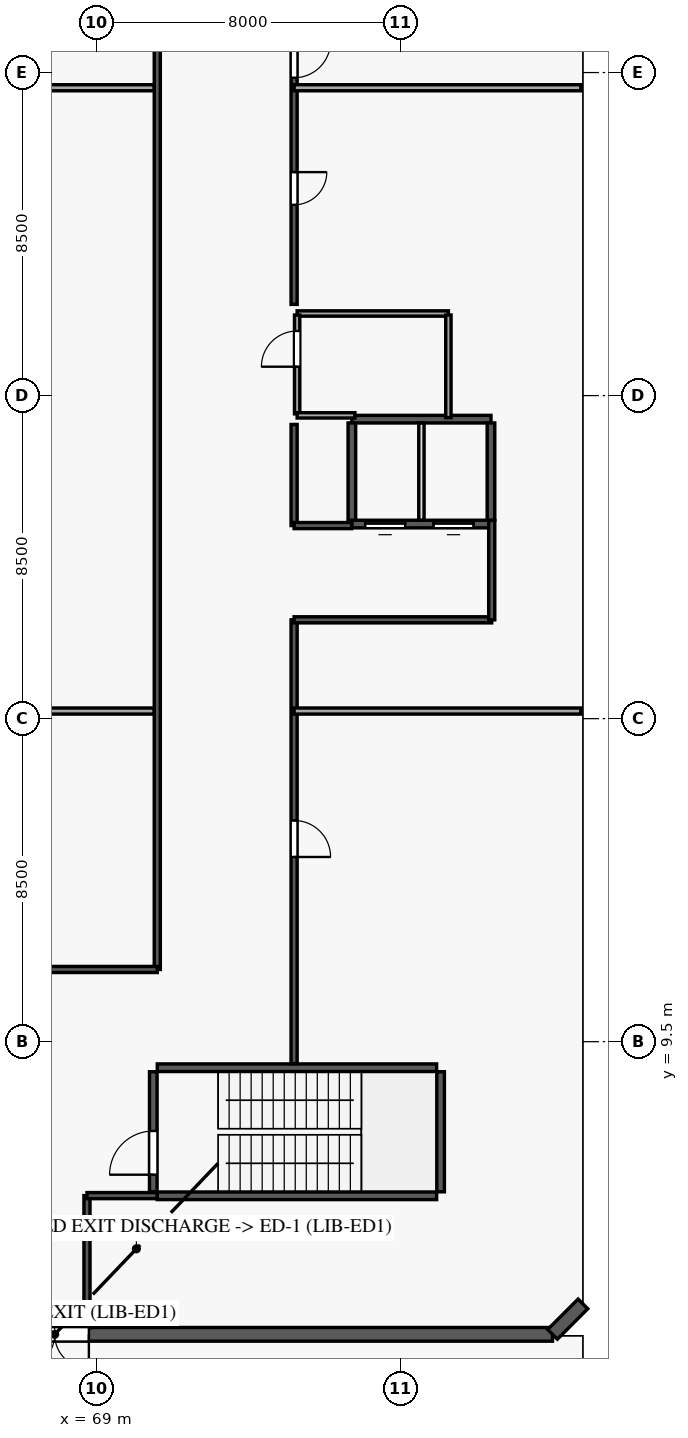
"""IFC4 building model, lengths in metres.
Left out: names, types, materials, properties, quantities, classifications, styles, units other than length and angle.
Written with IfcOpenShell. Run it as: python <this file> out.ifc"""

import sys

from ifc_helpers import new_model, si_unit, direction, frame, frame_2d, origin, origin_with_axes, origin_2d, place, context, subcontext, project, spatial, rectangle, circle, extrude, source, transform, mapped, element, fill, save


model = new_model("IFC4")
c1 = context("Model", 3, precision=1e-05, world=origin(), true_north=direction((0.0, 1.0)))
c2 = subcontext(c1, "Body", "Model", "MODEL_VIEW")
j1 = project(units=[si_unit("LENGTHUNIT", "METRE"), si_unit("PLANEANGLEUNIT", "RADIAN")], contexts=[c1])
p1 = place(None, origin())
s1 = spatial("IfcSite", under=j1, at=p1, CompositionType="ELEMENT")
p2 = place(p1, origin())
s2 = spatial("IfcBuilding", under=s1, at=p2, CompositionType="ELEMENT")
p3 = place(p2, origin())
s3 = spatial("IfcBuildingStorey", under=s2, at=p3, CompositionType="ELEMENT", Elevation=0.0)
m1 = source(origin_with_axes(), c2, "Body", "SweptSolid", [
    extrude(circle(Radius=0.375, at=origin_2d()), origin(), (0.0, 0.0, 1.0), 4.5),
])
for number, where, z_axis, x_axis in (
    (1, (69.6, 3.05, 0.0), (0.0, 0.0, 1.0), (1.0, 0.0, 0.0)),
    (2, (75.4, 3.05, 0.0), (0.0, 0.0, 1.0), (1.0, 0.0, 0.0)),
    (3, (81.2, 3.05, 0.0), (0.0, 0.0, 1.0), (1.0, 0.0, 0.0)),
    (4, (69.6, 4.8, 0.0), (0.0, 0.0, 1.0), (1.0, 0.0, 0.0)),
    (5, (69.6, 12.0, 0.0), (0.0, 0.0, 1.0), (1.0, 0.0, 0.0)),
    (6, (69.6, 19.2, 0.0), (0.0, 0.0, 1.0), (1.0, 0.0, 0.0)),
    (7, (69.6, 26.5, 0.0), (0.0, 0.0, 1.0), (1.0, 0.0, 0.0)),
    (8, (69.6, 33.8, 0.0), (0.0, 0.0, 1.0), (1.0, 0.0, 0.0)),
):
    element("IfcColumn", number, at=place(p3, frame(where, z_axis=z_axis, x_axis=x_axis)), inside=s3, PredefinedType="COLUMN", context=c2, shape_type="MappedRepresentation", body=[
        mapped(m1, transform((0.0, 0.0, 0.0), scale=1.0)),
    ])
m2 = source(origin_with_axes(), c2, "Body", "SweptSolid", [
    extrude(circle(Radius=0.425, at=origin_2d()), origin(), (0.0, 0.0, 1.0), 4.5),
])
for number, where, z_axis, x_axis in (
    (9, (75.4, 4.8, 0.0), (0.0, 0.0, 1.0), (1.0, 0.0, 0.0)),
    (10, (75.4, 12.0, 0.0), (0.0, 0.0, 1.0), (1.0, 0.0, 0.0)),
    (11, (75.4, 19.2, 0.0), (0.0, 0.0, 1.0), (1.0, 0.0, 0.0)),
    (12, (75.4, 26.5, 0.0), (0.0, 0.0, 1.0), (1.0, 0.0, 0.0)),
    (13, (75.4, 33.8, 0.0), (0.0, 0.0, 1.0), (1.0, 0.0, 0.0)),
):
    element("IfcColumn", number, at=place(p3, frame(where, z_axis=z_axis, x_axis=x_axis)), inside=s3, PredefinedType="COLUMN", context=c2, shape_type="MappedRepresentation", body=[
        mapped(m2, transform((0.0, 0.0, 0.0), scale=1.0)),
    ])
for number, where, z_axis, x_axis in (
    (14, (81.2, 4.8, 0.0), (0.0, 0.0, 1.0), (1.0, 0.0, 0.0)),
    (15, (81.2, 12.0, 0.0), (0.0, 0.0, 1.0), (1.0, 0.0, 0.0)),
    (16, (81.2, 19.2, 0.0), (0.0, 0.0, 1.0), (1.0, 0.0, 0.0)),
    (17, (81.2, 26.5, 0.0), (0.0, 0.0, 1.0), (1.0, 0.0, 0.0)),
    (18, (81.2, 33.8, 0.0), (0.0, 0.0, 1.0), (1.0, 0.0, 0.0)),
):
    element("IfcColumn", number, at=place(p3, frame(where, z_axis=z_axis, x_axis=x_axis)), inside=s3, PredefinedType="COLUMN", context=c2, shape_type="MappedRepresentation", body=[
        mapped(m1, transform((0.0, 0.0, 0.0), scale=1.0)),
    ])
m3 = source(origin_with_axes(), c2, "Body", "SweptSolid", [
    extrude(rectangle(XDim=0.5, YDim=0.75, at=origin_2d()), origin(), (0.0, 0.0, 1.0), 4.5),
])
p4 = place(p3, frame((72.5, 12.0, 0.0), z_axis=(0.0, 0.0, 1.0), x_axis=(1.0, 0.0, 0.0)))
e19 = element("IfcColumn", 19, at=p4, inside=s3, PredefinedType="PILASTER", context=c2, shape_type="MappedRepresentation", body=[
    mapped(m3, transform((0.0, 0.0, 0.0), scale=1.0)),
])
p5 = place(p3, frame((81.0, 1.8, 0.0), z_axis=(0.0, 0.0, 1.0), x_axis=(-1.0, 0.0, 0.0)))
e20 = element("IfcWall", 20, at=p5, inside=s3, PredefinedType="SOLIDWALL", context=c2, shape_type="SweptSolid", body=[
    extrude(rectangle(XDim=14.8, YDim=0.36, at=frame_2d((7.4, 0.0))), origin(), (0.0, 0.0, 1.0), 4.2),
])
p6 = place(p5, frame((8.285, 0.0, 0.85)))
e21 = element("IfcOpeningElement", 21, at=p6, cuts=e20, PredefinedType="OPENING", context=c2, shape_type="SweptSolid", body=[
    extrude(rectangle(XDim=1.6, YDim=2.2, at=frame_2d((0.8, 1.1))), frame((0.0, 0.19, 0.0), z_axis=(0.0, -1.0, 0.0), x_axis=(1.0, 0.0, 0.0)), (0.0, 0.0, 1.0), 0.38),
])
p7 = place(p5, frame((2.595, 0.0, 0.85)))
e22 = element("IfcOpeningElement", 22, at=p7, cuts=e20, PredefinedType="OPENING", context=c2, shape_type="SweptSolid", body=[
    extrude(rectangle(XDim=1.6, YDim=2.2, at=frame_2d((0.8, 1.1))), frame((0.0, 0.19, 0.0), z_axis=(0.0, -1.0, 0.0), x_axis=(1.0, 0.0, 0.0)), (0.0, 0.0, 1.0), 0.38),
])
p8 = place(p5, frame((12.2, 0.0, 0.0)))
e23 = element("IfcOpeningElement", 23, at=p8, cuts=e20, PredefinedType="OPENING", context=c2, shape_type="SweptSolid", body=[
    extrude(rectangle(XDim=1.8, YDim=2.3, at=frame_2d((0.9, 1.15))), frame((0.0, 0.19, 0.0), z_axis=(0.0, -1.0, 0.0), x_axis=(1.0, 0.0, 0.0)), (0.0, 0.0, 1.0), 0.38),
])
p9 = place(p3, frame((81.0, 1.8, 0.0), z_axis=(0.0, 0.0, 1.0), x_axis=(0.707106781187, 0.707106781187, 0.0)))
e24 = element("IfcWall", 24, at=p9, inside=s3, PredefinedType="SOLIDWALL", context=c2, shape_type="SweptSolid", body=[
    extrude(rectangle(XDim=1.131, YDim=0.36, at=frame_2d((0.566, 0.0))), origin(), (0.0, 0.0, 1.0), 4.2),
])
for number, where, z_axis, x_axis in (
    (25, (70.6, 5.445, 0.0), (0.0, 0.0, 1.0), (1.0, 0.0, 0.0)),
    (26, (70.6, 8.815, 0.0), (0.0, 0.0, 1.0), (1.0, 0.0, 0.0)),
):
    element("IfcWall", number, at=place(p3, frame(where, z_axis=z_axis, x_axis=x_axis)), inside=s3, PredefinedType="SHEAR", context=c2, shape_type="SweptSolid", body=[
        extrude(rectangle(XDim=7.35, YDim=0.2, at=frame_2d((3.675, 0.0))), origin(), (0.0, 0.0, 1.0), 4.2),
    ])
p10 = place(p3, frame((75.72, 23.12, 0.0), z_axis=(0.0, 0.0, 1.0), x_axis=(1.0, 0.0, 0.0)))
e27 = element("IfcWall", 27, at=p10, inside=s3, PredefinedType="SHEAR", context=c2, shape_type="SweptSolid", body=[
    extrude(rectangle(XDim=3.66, YDim=0.2, at=frame_2d((1.83, 0.0))), origin(), (0.0, 0.0, 1.0), 4.2),
])
p11 = place(p10, frame((0.35, 0.0, 0.0)))
e28 = element("IfcOpeningElement", 28, at=p11, cuts=e27, PredefinedType="OPENING", context=c2, shape_type="SweptSolid", body=[
    extrude(rectangle(XDim=1.05, YDim=2.15, at=frame_2d((0.525, 1.075))), frame((0.0, 0.11, 0.0), z_axis=(0.0, -1.0, 0.0), x_axis=(1.0, 0.0, 0.0)), (0.0, 0.0, 1.0), 0.22),
])
p12 = place(p10, frame((2.15, 0.0, 0.0)))
e29 = element("IfcOpeningElement", 29, at=p12, cuts=e27, PredefinedType="OPENING", context=c2, shape_type="SweptSolid", body=[
    extrude(rectangle(XDim=1.05, YDim=2.15, at=frame_2d((0.525, 1.075))), frame((0.0, 0.11, 0.0), z_axis=(0.0, -1.0, 0.0), x_axis=(1.0, 0.0, 0.0)), (0.0, 0.0, 1.0), 0.22),
])
p13 = place(p3, frame((75.72, 25.88, 0.0), z_axis=(0.0, 0.0, 1.0), x_axis=(1.0, 0.0, 0.0)))
e30 = element("IfcWall", 30, at=p13, inside=s3, PredefinedType="SHEAR", context=c2, shape_type="SweptSolid", body=[
    extrude(rectangle(XDim=3.66, YDim=0.2, at=frame_2d((1.83, 0.0))), origin(), (0.0, 0.0, 1.0), 4.2),
])
p14 = place(p3, frame((70.495, 5.55, 0.0), z_axis=(0.0, 0.0, 1.0), x_axis=(0.0, 1.0, 0.0)))
e31 = element("IfcWall", 31, at=p14, inside=s3, PredefinedType="SHEAR", context=c2, shape_type="SweptSolid", body=[
    extrude(rectangle(XDim=3.16, YDim=0.2, at=frame_2d((1.58, 0.0))), origin(), (0.0, 0.0, 1.0), 4.2),
])
p15 = place(p14, frame((0.45, 0.0, 0.0)))
e32 = element("IfcOpeningElement", 32, at=p15, cuts=e31, PredefinedType="OPENING", context=c2, shape_type="SweptSolid", body=[
    extrude(rectangle(XDim=1.15, YDim=2.15, at=frame_2d((0.575, 1.075))), frame((0.0, 0.11, 0.0), z_axis=(0.0, -1.0, 0.0), x_axis=(1.0, 0.0, 0.0)), (0.0, 0.0, 1.0), 0.22),
])
p16 = place(p3, frame((78.055, 5.55, 0.0), z_axis=(0.0, 0.0, 1.0), x_axis=(0.0, 1.0, 0.0)))
e33 = element("IfcWall", 33, at=p16, inside=s3, PredefinedType="SHEAR", context=c2, shape_type="SweptSolid", body=[
    extrude(rectangle(XDim=3.16, YDim=0.2, at=frame_2d((1.58, 0.0))), origin(), (0.0, 0.0, 1.0), 4.2),
])
for number, where, z_axis, x_axis in (
    (34, (75.72, 23.22, 0.0), (0.0, 0.0, 1.0), (0.0, 1.0, 0.0)),
    (35, (79.38, 23.22, 0.0), (0.0, 0.0, 1.0), (0.0, 1.0, 0.0)),
):
    element("IfcWall", number, at=place(p3, frame(where, z_axis=z_axis, x_axis=x_axis)), inside=s3, PredefinedType="SHEAR", context=c2, shape_type="SweptSolid", body=[
        extrude(rectangle(XDim=2.56, YDim=0.2, at=frame_2d((1.28, 0.0))), origin(), (0.0, 0.0, 1.0), 4.2),
    ])
p17 = place(p3, frame((70.6, 11.4, 0.0), z_axis=(0.0, 0.0, 1.0), x_axis=(0.0, 1.0, 0.0)))
e36 = element("IfcWall", 36, at=p17, inside=s3, PredefinedType="PARTITIONING", context=c2, shape_type="SweptSolid", body=[
    extrude(rectangle(XDim=30.2, YDim=0.16, at=frame_2d((15.1, 0.0))), origin(), (0.0, 0.0, 1.0), 4.2),
])
p18 = place(p3, frame((74.2, 44.038, 0.0), z_axis=(0.0, 0.0, 1.0), x_axis=(0.0, -1.0, 0.0)))
e37 = element("IfcWall", 37, at=p18, inside=s3, PredefinedType="PARTITIONING", context=c2, shape_type="SweptSolid", body=[
    extrude(rectangle(XDim=15.138, YDim=0.16, at=frame_2d((7.569, 0.0))), origin(), (0.0, 0.0, 1.0), 4.2),
])
p19 = place(p18, frame((8.216, 0.0, 0.0)))
e38 = element("IfcOpeningElement", 38, at=p19, cuts=e37, PredefinedType="OPENING", context=c2, shape_type="SweptSolid", body=[
    extrude(rectangle(XDim=0.96, YDim=2.15, at=frame_2d((0.48, 1.075))), frame((0.0, 0.09, 0.0), z_axis=(0.0, -1.0, 0.0), x_axis=(1.0, 0.0, 0.0)), (0.0, 0.0, 1.0), 0.18),
])
p20 = place(p18, frame((7.01, 0.0, 0.0)))
e39 = element("IfcOpeningElement", 39, at=p20, cuts=e37, PredefinedType="OPENING", context=c2, shape_type="SweptSolid", body=[
    extrude(rectangle(XDim=0.96, YDim=2.15, at=frame_2d((0.48, 1.075))), frame((0.0, 0.09, 0.0), z_axis=(0.0, -1.0, 0.0), x_axis=(1.0, 0.0, 0.0)), (0.0, 0.0, 1.0), 0.18),
])
p21 = place(p18, frame((11.658, 0.0, 0.0)))
e40 = element("IfcOpeningElement", 40, at=p21, cuts=e37, PredefinedType="OPENING", context=c2, shape_type="SweptSolid", body=[
    extrude(rectangle(XDim=0.86, YDim=2.04, at=frame_2d((0.43, 1.02))), frame((0.0, 0.09, 0.0), z_axis=(0.0, -1.0, 0.0), x_axis=(1.0, 0.0, 0.0)), (0.0, 0.0, 1.0), 0.18),
])
p22 = place(p3, frame((74.2, 20.6, 0.0), z_axis=(0.0, 0.0, 1.0), x_axis=(0.0, -1.0, 0.0)))
e41 = element("IfcWall", 41, at=p22, inside=s3, PredefinedType="PARTITIONING", context=c2, shape_type="SweptSolid", body=[
    extrude(rectangle(XDim=11.678, YDim=0.16, at=frame_2d((5.839, 0.0))), origin(), (0.0, 0.0, 1.0), 4.2),
])
p23 = place(p22, frame((5.28, 0.0, 0.0)))
e42 = element("IfcOpeningElement", 42, at=p23, cuts=e41, PredefinedType="OPENING", context=c2, shape_type="SweptSolid", body=[
    extrude(rectangle(XDim=0.96, YDim=2.15, at=frame_2d((0.48, 1.075))), frame((0.0, 0.09, 0.0), z_axis=(0.0, -1.0, 0.0), x_axis=(1.0, 0.0, 0.0)), (0.0, 0.0, 1.0), 0.18),
])
for number, where, z_axis, x_axis in (
    (43, (74.2, 18.2, 0.0), (0.0, 0.0, 1.0), (1.0, 0.0, 0.0)),
    (44, (74.2, 34.6, 0.0), (0.0, 0.0, 1.0), (1.0, 0.0, 0.0)),
):
    element("IfcWall", number, at=place(p3, frame(where, z_axis=z_axis, x_axis=x_axis)), inside=s3, PredefinedType="PARTITIONING", context=c2, shape_type="SweptSolid", body=[
        extrude(rectangle(XDim=7.545, YDim=0.16, at=frame_2d((3.772, 0.0))), origin(), (0.0, 0.0, 1.0), 4.2),
    ])
p24 = place(p3, frame((79.4, 20.6, 0.0), z_axis=(0.0, 0.0, 1.0), x_axis=(-1.0, 0.0, 0.0)))
e45 = element("IfcWall", 45, at=p24, inside=s3, PredefinedType="PARTITIONING", context=c2, shape_type="SweptSolid", body=[
    extrude(rectangle(XDim=5.2, YDim=0.16, at=frame_2d((2.6, 0.0))), origin(), (0.0, 0.0, 1.0), 4.2),
])
for number, where, z_axis, x_axis in (
    (46, (65.455, 18.2, 0.0), (0.0, 0.0, 1.0), (1.0, 0.0, 0.0)),
    (47, (65.455, 34.6, 0.0), (0.0, 0.0, 1.0), (1.0, 0.0, 0.0)),
):
    element("IfcWall", number, at=place(p3, frame(where, z_axis=z_axis, x_axis=x_axis)), inside=s3, PredefinedType="PARTITIONING", context=c2, shape_type="SweptSolid", body=[
        extrude(rectangle(XDim=5.06, YDim=0.16, at=frame_2d((2.53, 0.0))), origin(), (0.0, 0.0, 1.0), 4.2),
    ])
p25 = place(p3, frame((66.55, 11.4, 0.0), z_axis=(0.0, 0.0, 1.0), x_axis=(1.0, 0.0, 0.0)))
e48 = element("IfcWall", 48, at=p25, inside=s3, PredefinedType="PARTITIONING", context=c2, shape_type="SweptSolid", body=[
    extrude(rectangle(XDim=4.05, YDim=0.16, at=frame_2d((2.025, 0.0))), origin(), (0.0, 0.0, 1.0), 3.55),
])
p26 = place(p3, frame((74.28, 28.66, 0.0), z_axis=(0.0, 0.0, 1.0), x_axis=(1.0, 0.0, 0.0)))
e49 = element("IfcWall", 49, at=p26, inside=s3, PredefinedType="PARTITIONING", context=c2, shape_type="SweptSolid", body=[
    extrude(rectangle(XDim=3.98, YDim=0.14, at=frame_2d((1.99, 0.0))), origin(), (0.0, 0.0, 1.0), 4.2),
])
p27 = place(p3, frame((68.75, 5.45, 0.0), z_axis=(0.0, 0.0, 1.0), x_axis=(0.0, -1.0, 0.0)))
e50 = element("IfcWall", 50, at=p27, inside=s3, PredefinedType="PARTITIONING", context=c2, shape_type="SweptSolid", body=[
    extrude(rectangle(XDim=3.485, YDim=0.16, at=frame_2d((1.742, 0.0))), origin(), (0.0, 0.0, 1.0), 4.2),
])
p28 = place(p3, frame((78.26, 25.92, 0.0), z_axis=(0.0, 0.0, 1.0), x_axis=(0.0, 1.0, 0.0)))
e51 = element("IfcWall", 51, at=p28, inside=s3, PredefinedType="PARTITIONING", context=c2, shape_type="SweptSolid", body=[
    extrude(rectangle(XDim=2.7, YDim=0.14, at=frame_2d((1.35, 0.0))), origin(), (0.0, 0.0, 1.0), 4.2),
])
p29 = place(p3, frame((74.2, 25.74, 0.0), z_axis=(0.0, 0.0, 1.0), x_axis=(0.0, -1.0, 0.0)))
e52 = element("IfcWall", 52, at=p29, inside=s3, PredefinedType="PARTITIONING", context=c2, shape_type="SweptSolid", body=[
    extrude(rectangle(XDim=2.66, YDim=0.16, at=frame_2d((1.33, 0.0))), origin(), (0.0, 0.0, 1.0), 4.2),
])
p30 = place(p3, frame((74.28, 26.02, 0.0), z_axis=(0.0, 0.0, 1.0), x_axis=(0.0, 1.0, 0.0)))
e53 = element("IfcWall", 53, at=p30, inside=s3, PredefinedType="PARTITIONING", context=c2, shape_type="SweptSolid", body=[
    extrude(rectangle(XDim=2.6, YDim=0.14, at=frame_2d((1.3, 0.0))), origin(), (0.0, 0.0, 1.0), 4.2),
])
p31 = place(p30, frame((1.24, 0.0, 0.0)))
e54 = element("IfcOpeningElement", 54, at=p31, cuts=e53, PredefinedType="OPENING", context=c2, shape_type="SweptSolid", body=[
    extrude(rectangle(XDim=0.94, YDim=2.1, at=frame_2d((0.47, 1.05))), frame((0.0, 0.08, 0.0), z_axis=(0.0, -1.0, 0.0), x_axis=(1.0, 0.0, 0.0)), (0.0, 0.0, 1.0), 0.16),
])
p32 = place(p3, frame((77.55, 23.22, 0.0), z_axis=(0.0, 0.0, 1.0), x_axis=(0.0, 1.0, 0.0)))
e55 = element("IfcWall", 55, at=p32, inside=s3, PredefinedType="PARTITIONING", context=c2, shape_type="SweptSolid", body=[
    extrude(rectangle(XDim=2.56, YDim=0.14, at=frame_2d((1.28, 0.0))), origin(), (0.0, 0.0, 1.0), 4.2),
])
p33 = place(p3, frame((79.4, 23.215, 0.0), z_axis=(0.0, 0.0, 1.0), x_axis=(0.0, -1.0, 0.0)))
e56 = element("IfcWall", 56, at=p33, inside=s3, PredefinedType="PARTITIONING", context=c2, shape_type="SweptSolid", body=[
    extrude(rectangle(XDim=2.615, YDim=0.16, at=frame_2d((1.308, 0.0))), origin(), (0.0, 0.0, 1.0), 4.2),
])
p34 = place(p3, frame((74.28, 25.98, 0.0), z_axis=(0.0, 0.0, 1.0), x_axis=(1.0, 0.0, 0.0)))
e57 = element("IfcWall", 57, at=p34, inside=s3, PredefinedType="PARTITIONING", context=c2, shape_type="SweptSolid", body=[
    extrude(rectangle(XDim=1.52, YDim=0.14, at=frame_2d((0.76, 0.0))), origin(), (0.0, 0.0, 1.0), 3.55),
])
p35 = place(p3, frame((70.595, 5.45, 0.0), z_axis=(0.0, 0.0, 1.0), x_axis=(-1.0, 0.0, 0.0)))
e58 = element("IfcWall", 58, at=p35, inside=s3, PredefinedType="PARTITIONING", context=c2, shape_type="SweptSolid", body=[
    extrude(rectangle(XDim=1.845, YDim=0.16, at=frame_2d((0.922, 0.0))), origin(), (0.0, 0.0, 1.0), 3.55),
])
p36 = place(p3, frame((74.2, 23.08, 0.0), z_axis=(0.0, 0.0, 1.0), x_axis=(1.0, 0.0, 0.0)))
e59 = element("IfcWall", 59, at=p36, inside=s3, PredefinedType="PARTITIONING", context=c2, shape_type="SweptSolid", body=[
    extrude(rectangle(XDim=1.515, YDim=0.16, at=frame_2d((0.758, 0.0))), origin(), (0.0, 0.0, 1.0), 4.2),
])
m4 = source(origin_with_axes(), c2, "Body", "SweptSolid", [
    extrude(rectangle(XDim=1.6, YDim=2.2, at=frame_2d((0.8, 1.1))), frame((0.0, 0.03, 0.0), z_axis=(0.0, -1.0, 0.0), x_axis=(1.0, 0.0, 0.0)), (0.0, 0.0, 1.0), 0.06),
])
p37 = place(p6, origin())
e60 = element("IfcWindow", 60, at=p37, inside=s3, PartitioningType="SINGLE_PANEL", PredefinedType="WINDOW", context=c2, shape_type="MappedRepresentation", body=[
    mapped(m4, transform((0.0, 0.0, 0.0), scale=1.0)),
])
fill(e21, e60)
p38 = place(p7, origin())
e61 = element("IfcWindow", 61, at=p38, inside=s3, PartitioningType="SINGLE_PANEL", PredefinedType="WINDOW", context=c2, shape_type="MappedRepresentation", body=[
    mapped(m4, transform((0.0, 0.0, 0.0), scale=1.0)),
])
fill(e22, e61)
m5 = source(origin_with_axes(), c2, "Body", "SweptSolid", [
    extrude(rectangle(XDim=1.8, YDim=2.3, at=frame_2d((0.9, 1.15))), frame((0.0, 0.025, 0.0), z_axis=(0.0, -1.0, 0.0), x_axis=(1.0, 0.0, 0.0)), (0.0, 0.0, 1.0), 0.05),
])
p39 = place(p8, origin())
e62 = element("IfcDoor", 62, at=p39, inside=s3, OperationType="DOUBLE_DOOR_SINGLE_SWING", PredefinedType="DOOR", context=c2, shape_type="MappedRepresentation", body=[
    mapped(m5, transform((0.0, 0.0, 0.0), scale=1.0)),
])
fill(e23, e62)
m6 = source(origin_with_axes(), c2, "Body", "SweptSolid", [
    extrude(rectangle(XDim=1.15, YDim=2.15, at=frame_2d((0.575, 1.075))), frame((0.0, 0.025, 0.0), z_axis=(0.0, -1.0, 0.0), x_axis=(1.0, 0.0, 0.0)), (0.0, 0.0, 1.0), 0.05),
])
p40 = place(p15, origin())
e63 = element("IfcDoor", 63, at=p40, inside=s3, OperationType="SINGLE_SWING_LEFT", PredefinedType="DOOR", context=c2, shape_type="MappedRepresentation", body=[
    mapped(m6, transform((0.0, 0.0, 0.0), scale=1.0)),
])
fill(e32, e63)
m7 = source(origin_with_axes(), c2, "Body", "SweptSolid", [
    extrude(rectangle(XDim=1.05, YDim=2.15, at=frame_2d((0.525, 1.075))), frame((0.0, 0.025, 0.0), z_axis=(0.0, -1.0, 0.0), x_axis=(1.0, 0.0, 0.0)), (0.0, 0.0, 1.0), 0.05),
])
p41 = place(p11, origin())
e64 = element("IfcDoor", 64, at=p41, inside=s3, OperationType="SLIDING_TO_LEFT", PredefinedType="DOOR", context=c2, shape_type="MappedRepresentation", body=[
    mapped(m7, transform((0.0, 0.0, 0.0), scale=1.0)),
])
fill(e28, e64)
p42 = place(p12, origin())
e65 = element("IfcDoor", 65, at=p42, inside=s3, OperationType="SLIDING_TO_RIGHT", PredefinedType="DOOR", context=c2, shape_type="MappedRepresentation", body=[
    mapped(m7, transform((0.0, 0.0, 0.0), scale=1.0)),
])
fill(e29, e65)
m8 = source(origin_with_axes(), c2, "Body", "SweptSolid", [
    extrude(rectangle(XDim=0.94, YDim=2.1, at=frame_2d((0.47, 1.05))), frame((0.0, 0.025, 0.0), z_axis=(0.0, -1.0, 0.0), x_axis=(1.0, 0.0, 0.0)), (0.0, 0.0, 1.0), 0.05),
])
p43 = place(p31, origin())
e66 = element("IfcDoor", 66, at=p43, inside=s3, OperationType="SINGLE_SWING_LEFT", PredefinedType="DOOR", context=c2, shape_type="MappedRepresentation", body=[
    mapped(m8, transform((0.0, 0.0, 0.0), scale=1.0)),
])
fill(e54, e66)
m9 = source(origin_with_axes(), c2, "Body", "SweptSolid", [
    extrude(rectangle(XDim=0.96, YDim=2.15, at=frame_2d((0.48, 1.075))), frame((0.0, 0.025, 0.0), z_axis=(0.0, -1.0, 0.0), x_axis=(1.0, 0.0, 0.0)), (0.0, 0.0, 1.0), 0.05),
])
p44 = place(p23, origin())
e67 = element("IfcDoor", 67, at=p44, inside=s3, OperationType="SINGLE_SWING_RIGHT", PredefinedType="DOOR", context=c2, shape_type="MappedRepresentation", body=[
    mapped(m9, transform((0.0, 0.0, 0.0), scale=1.0)),
])
fill(e42, e67)
p45 = place(p19, origin())
e68 = element("IfcDoor", 68, at=p45, inside=s3, OperationType="SINGLE_SWING_LEFT", PredefinedType="DOOR", context=c2, shape_type="MappedRepresentation", body=[
    mapped(m9, transform((0.0, 0.0, 0.0), scale=1.0)),
])
fill(e38, e68)
m10 = source(origin_with_axes(), c2, "Body", "SweptSolid", [
    extrude(rectangle(XDim=0.86, YDim=2.04, at=frame_2d((0.43, 1.02))), frame((0.0, 0.025, 0.0), z_axis=(0.0, -1.0, 0.0), x_axis=(1.0, 0.0, 0.0)), (0.0, 0.0, 1.0), 0.05),
])
p46 = place(p21, origin())
e69 = element("IfcDoor", 69, at=p46, inside=s3, OperationType="SINGLE_SWING_LEFT", PredefinedType="DOOR", context=c2, shape_type="MappedRepresentation", body=[
    mapped(m10, transform((0.0, 0.0, 0.0), scale=1.0)),
])
fill(e40, e69)
save(model, sys.argv[1])
